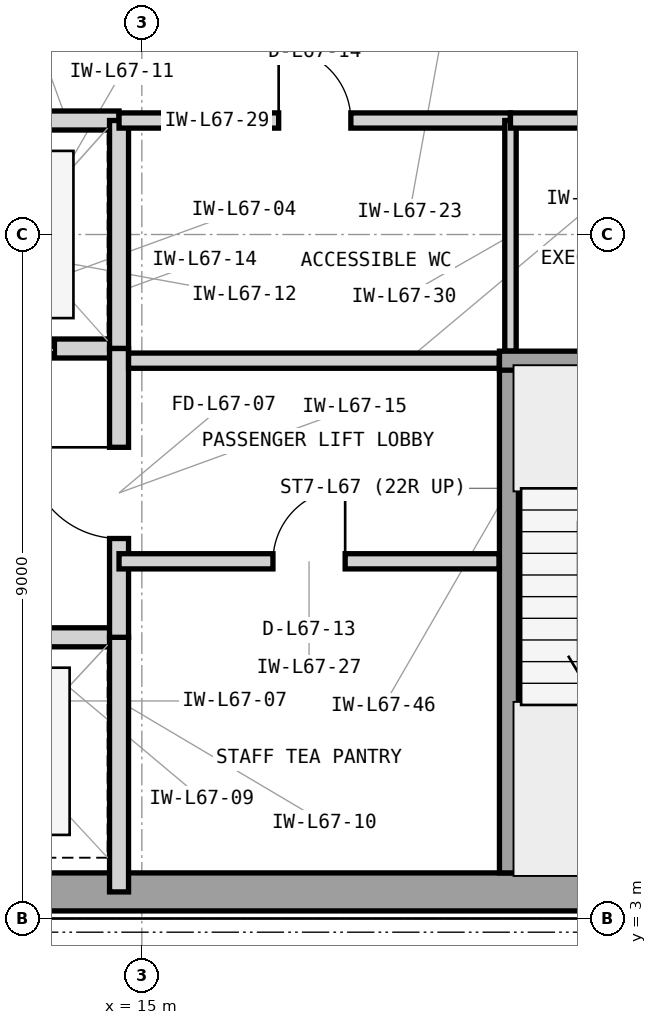
"""IFC4 building model, lengths in metres.
Left out: names, types, materials, properties, quantities, classifications, styles, units other than length and angle.
Written with IfcOpenShell. Run it as: python <this file> out.ifc"""

import sys

from ifc_helpers import new_model, si_unit, direction, frame, frame_2d, origin, place, context, subcontext, project, spatial, rectangle, extrude, element, fill, save


model = new_model("IFC4")
c1 = context("Model", 3, precision=1e-05, world=origin(), true_north=direction((0.0, 1.0)))
c2 = subcontext(c1, "Body", "Model", "MODEL_VIEW")
j1 = project(units=[si_unit("LENGTHUNIT", "METRE"), si_unit("PLANEANGLEUNIT", "RADIAN")], contexts=[c1])
p1 = place(None, origin())
s1 = spatial("IfcSite", under=j1, at=p1, CompositionType="ELEMENT")
p2 = place(p1, origin())
s2 = spatial("IfcBuilding", under=s1, at=p2, CompositionType="ELEMENT")
p3 = place(p2, frame((0.0, 0.0, 274.2)))
s3 = spatial("IfcBuildingStorey", under=s2, at=p3, CompositionType="ELEMENT", Elevation=274.2)
p4 = place(p3, frame((7.475, 3.35, 0.0), z_axis=(0.0, 0.0, 1.0), x_axis=(1.0, 0.0, 0.0)))
e1 = element("IfcWall", 1, at=p4, inside=s3, PredefinedType="SHEAR", context=c2, shape_type="SweptSolid", body=[
    extrude(rectangle(XDim=16.425, YDim=0.5, at=frame_2d((8.212, 0.0))), origin(), (0.0, 0.0, 1.0), 3.9),
])
p5 = place(p3, frame((11.82, 6.7, 0.0), z_axis=(0.0, 0.0, 1.0), x_axis=(1.0, 0.0, 0.0)))
e2 = element("IfcWall", 2, at=p5, inside=s3, PredefinedType="PARTITIONING", context=c2, shape_type="SweptSolid", body=[
    extrude(rectangle(XDim=2.88, YDim=0.25, at=frame_2d((1.44, 0.0))), origin(), (0.0, 0.0, 1.0), 3.088),
])
p6 = place(p5, frame((0.85, 0.0, 0.0)))
e3 = element("IfcOpeningElement", 3, at=p6, cuts=e2, PredefinedType="OPENING", context=c2, shape_type="SweptSolid", body=[
    extrude(rectangle(XDim=1.1, YDim=2.25, at=frame_2d((0.55, 1.125))), frame((0.0, 0.135, 0.0), z_axis=(0.0, -1.0, 0.0), x_axis=(1.0, 0.0, 0.0)), (0.0, 0.0, 1.0), 0.27),
])
p7 = place(p3, frame((14.7, 3.35, 0.0), z_axis=(0.0, 0.0, 1.0), x_axis=(0.0, 1.0, 0.0)))
e4 = element("IfcWall", 4, at=p7, inside=s3, PredefinedType="PARTITIONING", context=c2, shape_type="SweptSolid", body=[
    extrude(rectangle(XDim=3.35, YDim=0.25, at=frame_2d((1.675, 0.0))), origin(), (0.0, 0.0, 1.0), 3.705),
])
p8 = place(p3, frame((11.95, 10.5, 0.0), z_axis=(0.0, 0.0, 1.0), x_axis=(1.0, 0.0, 0.0)))
e5 = element("IfcWall", 5, at=p8, inside=s3, PredefinedType="PARTITIONING", context=c2, shape_type="SweptSolid", body=[
    extrude(rectangle(XDim=2.75, YDim=0.25, at=frame_2d((1.375, 0.0))), origin(), (0.0, 0.0, 1.0), 3.088),
])
p9 = place(p8, frame((0.8, 0.0, 0.0)))
e6 = element("IfcOpeningElement", 6, at=p9, cuts=e5, PredefinedType="OPENING", context=c2, shape_type="SweptSolid", body=[
    extrude(rectangle(XDim=1.1, YDim=2.25, at=frame_2d((0.55, 1.125))), frame((0.0, 0.135, 0.0), z_axis=(0.0, -1.0, 0.0), x_axis=(1.0, 0.0, 0.0)), (0.0, 0.0, 1.0), 0.27),
])
p10 = place(p3, frame((11.95, 13.5, 0.0), z_axis=(0.0, 0.0, 1.0), x_axis=(1.0, 0.0, 0.0)))
e7 = element("IfcWall", 7, at=p10, inside=s3, PredefinedType="PARTITIONING", context=c2, shape_type="SweptSolid", body=[
    extrude(rectangle(XDim=2.75, YDim=0.25, at=frame_2d((1.375, 0.0))), origin(), (0.0, 0.0, 1.0), 3.088),
])
p11 = place(p3, frame((14.7, 10.5, 0.0), z_axis=(0.0, 0.0, 1.0), x_axis=(0.0, 1.0, 0.0)))
e8 = element("IfcWall", 8, at=p11, inside=s3, PredefinedType="PARTITIONING", context=c2, shape_type="SweptSolid", body=[
    extrude(rectangle(XDim=3.0, YDim=0.25, at=frame_2d((1.5, 0.0))), origin(), (0.0, 0.0, 1.0), 3.705),
])
p12 = place(p3, frame((14.7, 6.7, 0.0), z_axis=(0.0, 0.0, 1.0), x_axis=(0.0, 1.0, 0.0)))
e9 = element("IfcWall", 9, at=p12, inside=s3, PredefinedType="PARTITIONING", context=c2, shape_type="SweptSolid", body=[
    extrude(rectangle(XDim=3.8, YDim=0.25, at=frame_2d((1.9, 0.0))), origin(), (0.0, 0.0, 1.0), 3.705),
])
p13 = place(p12, frame((1.3, 0.0, 0.0)))
e10 = element("IfcOpeningElement", 10, at=p13, cuts=e9, PredefinedType="OPENING", context=c2, shape_type="SweptSolid", body=[
    extrude(rectangle(XDim=1.2, YDim=2.2, at=frame_2d((0.6, 1.1))), frame((0.0, 0.135, 0.0), z_axis=(0.0, -1.0, 0.0), x_axis=(1.0, 0.0, 0.0)), (0.0, 0.0, 1.0), 0.27),
])
p14 = place(p3, frame((14.7, 7.7, 0.0), z_axis=(0.0, 0.0, 1.0), x_axis=(1.0, 0.0, 0.0)))
e11 = element("IfcWall", 11, at=p14, inside=s3, PredefinedType="PARTITIONING", context=c2, shape_type="SweptSolid", body=[
    extrude(rectangle(XDim=5.0, YDim=0.2, at=frame_2d((2.5, 0.0))), origin(), (0.0, 0.0, 1.0), 3.705),
])
p15 = place(p14, frame((2.025, 0.0, 0.0)))
e12 = element("IfcOpeningElement", 12, at=p15, cuts=e11, PredefinedType="OPENING", context=c2, shape_type="SweptSolid", body=[
    extrude(rectangle(XDim=0.95, YDim=2.1, at=frame_2d((0.475, 1.05))), frame((0.0, 0.11, 0.0), z_axis=(0.0, -1.0, 0.0), x_axis=(1.0, 0.0, 0.0)), (0.0, 0.0, 1.0), 0.22),
])
p16 = place(p3, frame((14.825, 10.34, 0.0), z_axis=(0.0, 0.0, 1.0), x_axis=(1.0, 0.0, 0.0)))
e13 = element("IfcWall", 13, at=p16, inside=s3, PredefinedType="PARTITIONING", context=c2, shape_type="SweptSolid", body=[
    extrude(rectangle(XDim=4.88, YDim=0.2, at=frame_2d((2.44, 0.0))), origin(), (0.0, 0.0, 1.0), 3.088),
])
p17 = place(p3, frame((14.7, 13.5, 0.0), z_axis=(0.0, 0.0, 1.0), x_axis=(1.0, 0.0, 0.0)))
e14 = element("IfcWall", 14, at=p17, inside=s3, PredefinedType="PARTITIONING", context=c2, shape_type="SweptSolid", body=[
    extrude(rectangle(XDim=5.15, YDim=0.2, at=frame_2d((2.575, 0.0))), origin(), (0.0, 0.0, 1.0), 3.088),
])
p18 = place(p17, frame((2.1, 0.0, 0.0)))
e15 = element("IfcOpeningElement", 15, at=p18, cuts=e14, PredefinedType="OPENING", context=c2, shape_type="SweptSolid", body=[
    extrude(rectangle(XDim=0.95, YDim=2.1, at=frame_2d((0.475, 1.05))), frame((0.0, 0.11, 0.0), z_axis=(0.0, -1.0, 0.0), x_axis=(1.0, 0.0, 0.0)), (0.0, 0.0, 1.0), 0.22),
])
p19 = place(p3, frame((19.85, 10.465, 0.0), z_axis=(0.0, 0.0, 1.0), x_axis=(0.0, 1.0, 0.0)))
e16 = element("IfcWall", 16, at=p19, inside=s3, PredefinedType="PARTITIONING", context=c2, shape_type="SweptSolid", body=[
    extrude(rectangle(XDim=3.035, YDim=0.15, at=frame_2d((1.518, 0.0))), origin(), (0.0, 0.0, 1.0), 3.705),
])
p20 = place(p3, frame((19.85, 13.5, 0.0), z_axis=(0.0, 0.0, 1.0), x_axis=(1.0, 0.0, 0.0)))
e17 = element("IfcWall", 17, at=p20, inside=s3, PredefinedType="PARTITIONING", context=c2, shape_type="SweptSolid", body=[
    extrude(rectangle(XDim=3.8, YDim=0.2, at=frame_2d((1.9, 0.0))), origin(), (0.0, 0.0, 1.0), 3.088),
])
p21 = place(p20, frame((1.425, 0.0, 0.0)))
e18 = element("IfcOpeningElement", 18, at=p21, cuts=e17, PredefinedType="OPENING", context=c2, shape_type="SweptSolid", body=[
    extrude(rectangle(XDim=0.95, YDim=2.1, at=frame_2d((0.475, 1.05))), frame((0.0, 0.11, 0.0), z_axis=(0.0, -1.0, 0.0), x_axis=(1.0, 0.0, 0.0)), (0.0, 0.0, 1.0), 0.22),
])
p22 = place(p3, frame((19.83, 3.6, 0.0), z_axis=(0.0, 0.0, 1.0), x_axis=(0.0, 1.0, 0.0)))
e19 = element("IfcWall", 19, at=p22, inside=s3, PredefinedType="SHEAR", context=c2, shape_type="SweptSolid", body=[
    extrude(rectangle(XDim=6.74, YDim=0.25, at=frame_2d((3.37, 0.0))), origin(), (0.0, 0.0, 1.0), 3.9),
])
p23 = place(p3, frame((19.705, 10.34, 0.0), z_axis=(0.0, 0.0, 1.0), x_axis=(1.0, 0.0, 0.0)))
e20 = element("IfcWall", 20, at=p23, inside=s3, PredefinedType="SHEAR", context=c2, shape_type="SweptSolid", body=[
    extrude(rectangle(XDim=3.82, YDim=0.25, at=frame_2d((1.91, 0.0))), origin(), (0.0, 0.0, 1.0), 3.9),
])
p24 = place(p9, origin())
e21 = element("IfcDoor", 21, at=p24, inside=s3, OperationType="DOUBLE_DOOR_SLIDING", PredefinedType="DOOR", context=c2, shape_type="SweptSolid", body=[
    extrude(rectangle(XDim=1.1, YDim=2.25, at=frame_2d((0.55, 1.125))), frame((0.0, 0.025, 0.0), z_axis=(0.0, -1.0, 0.0), x_axis=(1.0, 0.0, 0.0)), (0.0, 0.0, 1.0), 0.05),
])
fill(e6, e21)
p25 = place(p13, origin())
e22 = element("IfcDoor", 22, at=p25, inside=s3, OperationType="SINGLE_SWING_RIGHT", PredefinedType="DOOR", context=c2, shape_type="SweptSolid", body=[
    extrude(rectangle(XDim=1.2, YDim=2.2, at=frame_2d((0.6, 1.1))), frame((0.0, 0.025, 0.0), z_axis=(0.0, -1.0, 0.0), x_axis=(1.0, 0.0, 0.0)), (0.0, 0.0, 1.0), 0.05),
])
fill(e10, e22)
p26 = place(p15, origin())
e23 = element("IfcDoor", 23, at=p26, inside=s3, OperationType="SINGLE_SWING_RIGHT", PredefinedType="DOOR", context=c2, shape_type="SweptSolid", body=[
    extrude(rectangle(XDim=0.95, YDim=2.1, at=frame_2d((0.475, 1.05))), frame((0.0, 0.025, 0.0), z_axis=(0.0, -1.0, 0.0), x_axis=(1.0, 0.0, 0.0)), (0.0, 0.0, 1.0), 0.05),
])
fill(e12, e23)
p27 = place(p18, origin())
e24 = element("IfcDoor", 24, at=p27, inside=s3, OperationType="SINGLE_SWING_LEFT", PredefinedType="DOOR", context=c2, shape_type="SweptSolid", body=[
    extrude(rectangle(XDim=0.95, YDim=2.1, at=frame_2d((0.475, 1.05))), frame((0.0, 0.025, 0.0), z_axis=(0.0, -1.0, 0.0), x_axis=(1.0, 0.0, 0.0)), (0.0, 0.0, 1.0), 0.05),
])
fill(e15, e24)
save(model, sys.argv[1])
